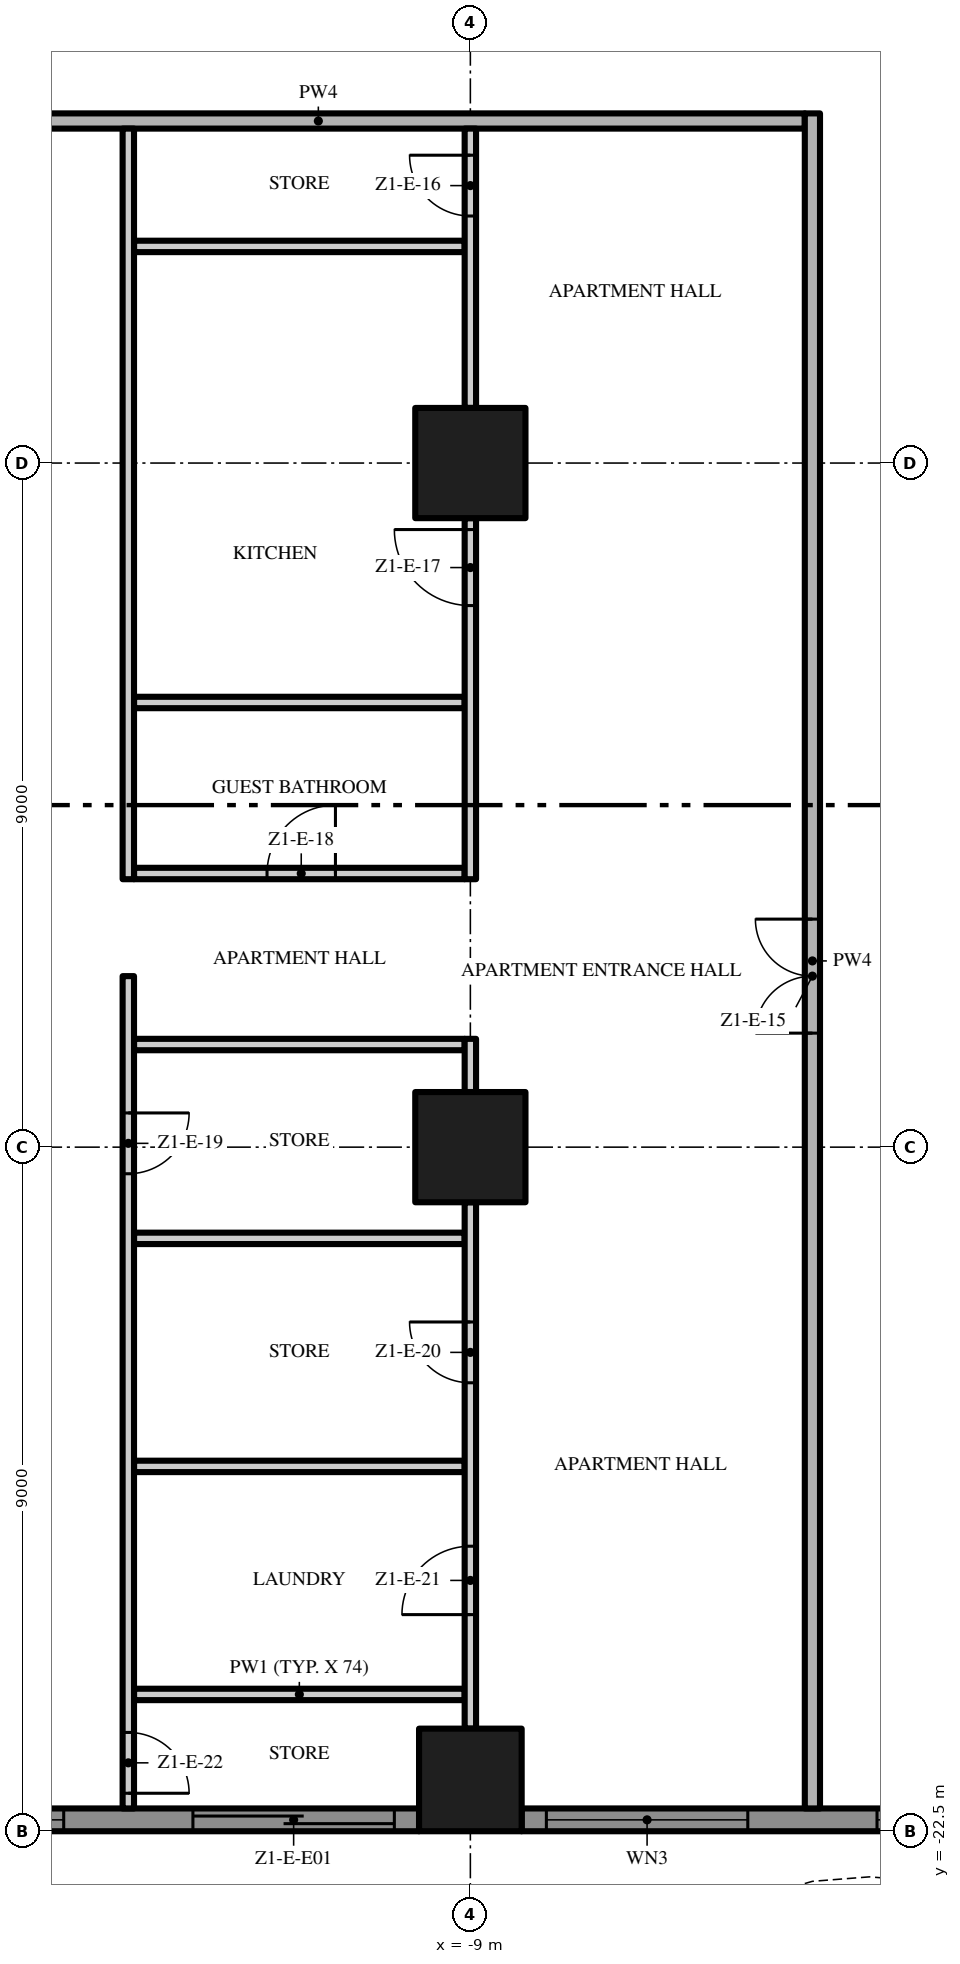
"""IFC4 building model, lengths in metres.
Left out: names, types, materials, properties, quantities, classifications, styles, units other than length and angle.
Written with IfcOpenShell. Run it as: python <this file> out.ifc"""

import sys

from ifc_helpers import new_model, si_unit, direction, frame, frame_2d, origin, origin_2d, place, context, subcontext, project, spatial, polyline, rectangle, outline, extrude, element, fill, save


model = new_model("IFC4")
c1 = context("Model", 3, precision=1e-05, world=origin(), true_north=direction((0.0, 1.0)))
c2 = subcontext(c1, "Body", "Model", "MODEL_VIEW")
j1 = project(units=[si_unit("LENGTHUNIT", "METRE"), si_unit("PLANEANGLEUNIT", "RADIAN")], contexts=[c1])
p1 = place(None, origin())
s1 = spatial("IfcSite", under=j1, at=p1, CompositionType="ELEMENT")
p2 = place(p1, origin())
s2 = spatial("IfcBuilding", under=s1, at=p2, CompositionType="ELEMENT")
p3 = place(p2, frame((0.0, 0.0, 60.6)))
s3 = spatial("IfcBuildingStorey", under=s2, at=p3, CompositionType="ELEMENT", Elevation=60.6)
p4 = place(p3, frame((-9.0, -13.5, 0.0), z_axis=(0.0, 0.0, 1.0), x_axis=(1.0, 0.0, 0.0)))
e1 = element("IfcColumn", 1, at=p4, inside=s3, PredefinedType="COLUMN", context=c2, shape_type="SweptSolid", body=[
    extrude(rectangle(XDim=1.45, YDim=1.45, at=origin_2d()), origin(), (0.0, 0.0, 1.0), 3.5),
])
p5 = place(p3, frame((-9.0, -21.825, 0.0), z_axis=(0.0, 0.0, 1.0), x_axis=(1.0, 0.0, 0.0)))
e2 = element("IfcColumn", 2, at=p5, inside=s3, PredefinedType="COLUMN", context=c2, shape_type="SweptSolid", body=[
    extrude(rectangle(XDim=1.35, YDim=1.35, at=origin_2d()), origin(), (0.0, 0.0, 1.0), 3.5),
])
p6 = place(p3, frame((-9.0, -4.5, 0.0), z_axis=(0.0, 0.0, 1.0), x_axis=(1.0, 0.0, 0.0)))
e3 = element("IfcColumn", 3, at=p6, inside=s3, PredefinedType="COLUMN", context=c2, shape_type="SweptSolid", body=[
    extrude(rectangle(XDim=1.45, YDim=1.45, at=origin_2d()), origin(), (0.0, 0.0, 1.0), 3.5),
])
p7 = place(p3, frame((-9.675, -22.35, 0.0), z_axis=(0.0, 0.0, 1.0), x_axis=(-1.0, 0.0, 0.0)))
e4 = element("IfcWall", 4, at=p7, inside=s3, PredefinedType="SOLIDWALL", context=c2, shape_type="SweptSolid", body=[
    extrude(rectangle(XDim=7.65, YDim=0.3, at=frame_2d((3.825, 0.0))), origin(), (0.0, 0.0, 1.0), 3.5),
])
p8 = place(p7, frame((4.675, 0.0, 0.45)))
e5 = element("IfcOpeningElement", 5, at=p8, cuts=e4, PredefinedType="OPENING", context=c2, shape_type="SweptSolid", body=[
    extrude(rectangle(XDim=2.65, YDim=2.65, at=frame_2d((1.325, 1.325))), frame((0.0, 0.16, 0.0), z_axis=(0.0, -1.0, 0.0), x_axis=(1.0, 0.0, 0.0)), (0.0, 0.0, 1.0), 0.32),
])
p9 = place(p7, frame((0.325, 0.0, 0.0)))
e6 = element("IfcOpeningElement", 6, at=p9, cuts=e4, PredefinedType="OPENING", context=c2, shape_type="SweptSolid", body=[
    extrude(rectangle(XDim=2.65, YDim=2.4, at=frame_2d((1.325, 1.2))), frame((0.0, 0.16, 0.0), z_axis=(0.0, -1.0, 0.0), x_axis=(1.0, 0.0, 0.0)), (0.0, 0.0, 1.0), 0.32),
])
p10 = place(p3, frame((-0.675, -22.35, 0.0), z_axis=(0.0, 0.0, 1.0), x_axis=(-1.0, 0.0, 0.0)))
e7 = element("IfcWall", 7, at=p10, inside=s3, PredefinedType="SOLIDWALL", context=c2, shape_type="SweptSolid", body=[
    extrude(rectangle(XDim=7.65, YDim=0.3, at=frame_2d((3.825, 0.0))), origin(), (0.0, 0.0, 1.0), 3.5),
])
p11 = place(p10, frame((4.675, 0.0, 0.45)))
e8 = element("IfcOpeningElement", 8, at=p11, cuts=e7, PredefinedType="OPENING", context=c2, shape_type="SweptSolid", body=[
    extrude(rectangle(XDim=2.65, YDim=2.65, at=frame_2d((1.325, 1.325))), frame((0.0, 0.16, 0.0), z_axis=(0.0, -1.0, 0.0), x_axis=(1.0, 0.0, 0.0)), (0.0, 0.0, 1.0), 0.32),
])
p12 = place(p10, frame((0.325, 0.0, 0.45)))
e9 = element("IfcOpeningElement", 9, at=p12, cuts=e7, PredefinedType="OPENING", context=c2, shape_type="SweptSolid", body=[
    extrude(rectangle(XDim=2.65, YDim=2.65, at=frame_2d((1.325, 1.325))), frame((0.0, 0.16, 0.0), z_axis=(0.0, -1.0, 0.0), x_axis=(1.0, 0.0, 0.0)), (0.0, 0.0, 1.0), 0.32),
])
p13 = place(p3, origin())
e10 = element("IfcWall", 10, at=p13, inside=s3, PredefinedType="USERDEFINED", context=c2, shape_type="SweptSolid", body=[
    extrude(outline(polyline([(-22.5, -24.3), (-21.0, -23.595), (-19.5, -23.159), (-18.75, -23.1), (-18.0, -23.159), (-16.5, -23.595), (-15.0, -24.3), (-13.5, -25.005), (-12.0, -25.441), (-11.25, -25.5), (-10.5, -25.441), (-9.0, -25.005), (-7.5, -24.3), (-6.0, -23.595), (-4.5, -23.159), (-3.75, -23.1), (-3.0, -23.159), (-1.5, -23.595), (0.0, -24.3), (1.5, -25.005), (3.0, -25.441), (3.75, -25.5), (4.5, -25.441), (6.0, -25.005), (7.5, -24.3), (9.0, -23.595), (10.5, -23.159), (11.25, -23.1), (12.0, -23.159), (13.5, -23.595), (15.0, -24.3), (16.5, -25.005), (18.0, -25.441), (18.75, -25.5), (19.5, -25.441), (21.0, -25.005), (22.5, -24.3), (22.394, -24.074), (20.911, -24.771), (19.455, -25.194), (18.75, -25.249), (18.045, -25.194), (16.589, -24.771), (15.106, -24.074), (13.589, -23.36), (12.045, -22.911), (11.25, -22.849), (10.455, -22.911), (8.911, -23.36), (7.394, -24.074), (5.911, -24.771), (4.455, -25.194), (3.75, -25.249), (3.045, -25.194), (1.589, -24.771), (0.106, -24.074), (-1.411, -23.36), (-2.955, -22.911), (-3.75, -22.849), (-4.545, -22.911), (-6.089, -23.36), (-7.606, -24.074), (-9.089, -24.771), (-10.545, -25.194), (-11.25, -25.249), (-11.955, -25.194), (-13.411, -24.771), (-14.894, -24.074), (-16.411, -23.36), (-17.955, -22.911), (-18.75, -22.849), (-19.545, -22.911), (-21.089, -23.36), (-22.606, -24.074), (-22.5, -24.3)])), origin(), (0.0, 0.0, 1.0), 0.9),
])
for number, where, z_axis, x_axis in (
    (11, (-13.425, -20.7, 0.0), (0.0, 0.0, 1.0), (1.0, 0.0, 0.0)),
    (12, (-13.425, -17.7, 0.0), (0.0, 0.0, 1.0), (1.0, 0.0, 0.0)),
    (13, (-13.425, -14.7, 0.0), (0.0, 0.0, 1.0), (1.0, 0.0, 0.0)),
    (14, (-13.425, -12.15, 0.0), (0.0, 0.0, 1.0), (1.0, 0.0, 0.0)),
):
    element("IfcWall", number, at=place(p3, frame(where, z_axis=z_axis, x_axis=x_axis)), inside=s3, PredefinedType="PARTITIONING", context=c2, shape_type="SweptSolid", body=[
        extrude(rectangle(XDim=4.35, YDim=0.15, at=frame_2d((2.175, 0.0))), origin(), (0.0, 0.0, 1.0), 3.5),
    ])
p14 = place(p3, frame((-13.425, -9.9, 0.0), z_axis=(0.0, 0.0, 1.0), x_axis=(1.0, 0.0, 0.0)))
e15 = element("IfcWall", 15, at=p14, inside=s3, PredefinedType="PARTITIONING", context=c2, shape_type="SweptSolid", body=[
    extrude(rectangle(XDim=4.35, YDim=0.15, at=frame_2d((2.175, 0.0))), origin(), (0.0, 0.0, 1.0), 3.5),
])
p15 = place(p14, frame((1.75, 0.0, 0.0)))
e16 = element("IfcOpeningElement", 16, at=p15, cuts=e15, PredefinedType="OPENING", context=c2, shape_type="SweptSolid", body=[
    extrude(rectangle(XDim=0.9, YDim=2.1, at=frame_2d((0.45, 1.05))), frame((0.0, 0.085, 0.0), z_axis=(0.0, -1.0, 0.0), x_axis=(1.0, 0.0, 0.0)), (0.0, 0.0, 1.0), 0.17),
])
for number, where, z_axis, x_axis in (
    (17, (-13.425, -7.65, 0.0), (0.0, 0.0, 1.0), (1.0, 0.0, 0.0)),
    (18, (-13.425, -1.65, 0.0), (0.0, 0.0, 1.0), (1.0, 0.0, 0.0)),
):
    element("IfcWall", number, at=place(p3, frame(where, z_axis=z_axis, x_axis=x_axis)), inside=s3, PredefinedType="PARTITIONING", context=c2, shape_type="SweptSolid", body=[
        extrude(rectangle(XDim=4.35, YDim=0.15, at=frame_2d((2.175, 0.0))), origin(), (0.0, 0.0, 1.0), 3.5),
    ])
p16 = place(p3, frame((-17.4, 0.0, 0.0), z_axis=(0.0, 0.0, 1.0), x_axis=(1.0, 0.0, 0.0)))
e19 = element("IfcWall", 19, at=p16, inside=s3, PredefinedType="PARTITIONING", context=c2, shape_type="SweptSolid", body=[
    extrude(rectangle(XDim=12.8, YDim=0.2, at=frame_2d((6.4, 0.0))), origin(), (0.0, 0.0, 1.0), 3.5),
])
p17 = place(p3, frame((-13.5, -11.25, 0.0), z_axis=(0.0, 0.0, 1.0), x_axis=(0.0, -1.0, 0.0)))
e20 = element("IfcWall", 20, at=p17, inside=s3, PredefinedType="PARTITIONING", context=c2, shape_type="SweptSolid", body=[
    extrude(rectangle(XDim=10.95, YDim=0.15, at=frame_2d((5.475, 0.0))), origin(), (0.0, 0.0, 1.0), 3.5),
])
p18 = place(p17, frame((1.8, 0.0, 0.0)))
e21 = element("IfcOpeningElement", 21, at=p18, cuts=e20, PredefinedType="OPENING", context=c2, shape_type="SweptSolid", body=[
    extrude(rectangle(XDim=0.8, YDim=2.0, at=frame_2d((0.4, 1.0))), frame((0.0, 0.085, 0.0), z_axis=(0.0, -1.0, 0.0), x_axis=(1.0, 0.0, 0.0)), (0.0, 0.0, 1.0), 0.17),
])
p19 = place(p17, frame((9.95, 0.0, 0.0)))
e22 = element("IfcOpeningElement", 22, at=p19, cuts=e20, PredefinedType="OPENING", context=c2, shape_type="SweptSolid", body=[
    extrude(rectangle(XDim=0.8, YDim=2.0, at=frame_2d((0.4, 1.0))), frame((0.0, 0.085, 0.0), z_axis=(0.0, -1.0, 0.0), x_axis=(1.0, 0.0, 0.0)), (0.0, 0.0, 1.0), 0.17),
])
p20 = place(p3, frame((-13.5, -9.975, 0.0), z_axis=(0.0, 0.0, 1.0), x_axis=(0.0, 1.0, 0.0)))
e23 = element("IfcWall", 23, at=p20, inside=s3, PredefinedType="PARTITIONING", context=c2, shape_type="SweptSolid", body=[
    extrude(rectangle(XDim=9.875, YDim=0.15, at=frame_2d((4.938, 0.0))), origin(), (0.0, 0.0, 1.0), 3.5),
])
p21 = place(p3, frame((-9.0, -21.15, 0.0), z_axis=(0.0, 0.0, 1.0), x_axis=(0.0, 1.0, 0.0)))
e24 = element("IfcWall", 24, at=p21, inside=s3, PredefinedType="PARTITIONING", context=c2, shape_type="SweptSolid", body=[
    extrude(rectangle(XDim=6.925, YDim=0.15, at=frame_2d((3.462, 0.0))), origin(), (0.0, 0.0, 1.0), 3.5),
])
p22 = place(p21, frame((4.55, 0.0, 0.0)))
e25 = element("IfcOpeningElement", 25, at=p22, cuts=e24, PredefinedType="OPENING", context=c2, shape_type="SweptSolid", body=[
    extrude(rectangle(XDim=0.8, YDim=2.0, at=frame_2d((0.4, 1.0))), frame((0.0, 0.085, 0.0), z_axis=(0.0, -1.0, 0.0), x_axis=(1.0, 0.0, 0.0)), (0.0, 0.0, 1.0), 0.17),
])
p23 = place(p21, frame((1.5, 0.0, 0.0)))
e26 = element("IfcOpeningElement", 26, at=p23, cuts=e24, PredefinedType="OPENING", context=c2, shape_type="SweptSolid", body=[
    extrude(rectangle(XDim=0.9, YDim=2.1, at=frame_2d((0.45, 1.05))), frame((0.0, 0.085, 0.0), z_axis=(0.0, -1.0, 0.0), x_axis=(1.0, 0.0, 0.0)), (0.0, 0.0, 1.0), 0.17),
])
p24 = place(p3, frame((-9.0, -12.775, 0.0), z_axis=(0.0, 0.0, 1.0), x_axis=(0.0, 1.0, 0.0)))
e27 = element("IfcWall", 27, at=p24, inside=s3, PredefinedType="PARTITIONING", context=c2, shape_type="SweptSolid", body=[
    extrude(rectangle(XDim=0.7, YDim=0.15, at=frame_2d((0.35, 0.0))), origin(), (0.0, 0.0, 1.0), 3.5),
])
p25 = place(p3, frame((-9.0, -9.975, 0.0), z_axis=(0.0, 0.0, 1.0), x_axis=(0.0, 1.0, 0.0)))
e28 = element("IfcWall", 28, at=p25, inside=s3, PredefinedType="PARTITIONING", context=c2, shape_type="SweptSolid", body=[
    extrude(rectangle(XDim=4.75, YDim=0.15, at=frame_2d((2.375, 0.0))), origin(), (0.0, 0.0, 1.0), 3.5),
])
p26 = place(p25, frame((3.6, 0.0, 0.0)))
e29 = element("IfcOpeningElement", 29, at=p26, cuts=e28, PredefinedType="OPENING", context=c2, shape_type="SweptSolid", body=[
    extrude(rectangle(XDim=1.0, YDim=2.4, at=frame_2d((0.5, 1.2))), frame((0.0, 0.085, 0.0), z_axis=(0.0, -1.0, 0.0), x_axis=(1.0, 0.0, 0.0)), (0.0, 0.0, 1.0), 0.17),
])
p27 = place(p3, frame((-9.0, -3.775, 0.0), z_axis=(0.0, 0.0, 1.0), x_axis=(0.0, 1.0, 0.0)))
e30 = element("IfcWall", 30, at=p27, inside=s3, PredefinedType="PARTITIONING", context=c2, shape_type="SweptSolid", body=[
    extrude(rectangle(XDim=3.675, YDim=0.15, at=frame_2d((1.837, 0.0))), origin(), (0.0, 0.0, 1.0), 3.5),
])
p28 = place(p27, frame((2.525, 0.0, 0.0)))
e31 = element("IfcOpeningElement", 31, at=p28, cuts=e30, PredefinedType="OPENING", context=c2, shape_type="SweptSolid", body=[
    extrude(rectangle(XDim=0.8, YDim=2.0, at=frame_2d((0.4, 1.0))), frame((0.0, 0.085, 0.0), z_axis=(0.0, -1.0, 0.0), x_axis=(1.0, 0.0, 0.0)), (0.0, 0.0, 1.0), 0.17),
])
p29 = place(p3, frame((-4.5, -22.2, 0.0), z_axis=(0.0, 0.0, 1.0), x_axis=(0.0, 1.0, 0.0)))
e32 = element("IfcWall", 32, at=p29, inside=s3, PredefinedType="PARTITIONING", context=c2, shape_type="SweptSolid", body=[
    extrude(rectangle(XDim=22.3, YDim=0.2, at=frame_2d((11.15, 0.0))), origin(), (0.0, 0.0, 1.0), 3.5),
])
p30 = place(p29, frame((10.2, 0.0, 0.0)))
e33 = element("IfcOpeningElement", 33, at=p30, cuts=e32, PredefinedType="OPENING", context=c2, shape_type="SweptSolid", body=[
    extrude(rectangle(XDim=1.5, YDim=2.4, at=frame_2d((0.75, 1.2))), frame((0.0, 0.11, 0.0), z_axis=(0.0, -1.0, 0.0), x_axis=(1.0, 0.0, 0.0)), (0.0, 0.0, 1.0), 0.22),
])
p31 = place(p8, origin())
e34 = element("IfcWindow", 34, at=p31, inside=s3, PartitioningType="SINGLE_PANEL", PredefinedType="WINDOW", context=c2, shape_type="SweptSolid", body=[
    extrude(rectangle(XDim=2.65, YDim=2.65, at=frame_2d((1.325, 1.325))), frame((0.0, 0.03, 0.0), z_axis=(0.0, -1.0, 0.0), x_axis=(1.0, 0.0, 0.0)), (0.0, 0.0, 1.0), 0.06),
])
fill(e5, e34)
p32 = place(p9, origin())
e35 = element("IfcDoor", 35, at=p32, inside=s3, OperationType="SINGLE_SWING_LEFT", PredefinedType="DOOR", context=c2, shape_type="SweptSolid", body=[
    extrude(rectangle(XDim=2.65, YDim=2.4, at=frame_2d((1.325, 1.2))), frame((0.0, 0.025, 0.0), z_axis=(0.0, -1.0, 0.0), x_axis=(1.0, 0.0, 0.0)), (0.0, 0.0, 1.0), 0.05),
])
fill(e6, e35)
p33 = place(p11, origin())
e36 = element("IfcWindow", 36, at=p33, inside=s3, PartitioningType="SINGLE_PANEL", PredefinedType="WINDOW", context=c2, shape_type="SweptSolid", body=[
    extrude(rectangle(XDim=2.65, YDim=2.65, at=frame_2d((1.325, 1.325))), frame((0.0, 0.03, 0.0), z_axis=(0.0, -1.0, 0.0), x_axis=(1.0, 0.0, 0.0)), (0.0, 0.0, 1.0), 0.06),
])
fill(e8, e36)
p34 = place(p12, origin())
e37 = element("IfcWindow", 37, at=p34, inside=s3, PartitioningType="SINGLE_PANEL", PredefinedType="WINDOW", context=c2, shape_type="SweptSolid", body=[
    extrude(rectangle(XDim=2.65, YDim=2.65, at=frame_2d((1.325, 1.325))), frame((0.0, 0.03, 0.0), z_axis=(0.0, -1.0, 0.0), x_axis=(1.0, 0.0, 0.0)), (0.0, 0.0, 1.0), 0.06),
])
fill(e9, e37)
p35 = place(p30, origin())
e38 = element("IfcDoor", 38, at=p35, inside=s3, OperationType="DOUBLE_DOOR_SINGLE_SWING", PredefinedType="DOOR", context=c2, shape_type="SweptSolid", body=[
    extrude(rectangle(XDim=1.5, YDim=2.4, at=frame_2d((0.75, 1.2))), frame((0.0, 0.025, 0.0), z_axis=(0.0, -1.0, 0.0), x_axis=(1.0, 0.0, 0.0)), (0.0, 0.0, 1.0), 0.05),
])
fill(e33, e38)
p36 = place(p28, origin())
e39 = element("IfcDoor", 39, at=p36, inside=s3, OperationType="SINGLE_SWING_RIGHT", PredefinedType="DOOR", context=c2, shape_type="SweptSolid", body=[
    extrude(rectangle(XDim=0.8, YDim=2.0, at=frame_2d((0.4, 1.0))), frame((0.0, 0.025, 0.0), z_axis=(0.0, -1.0, 0.0), x_axis=(1.0, 0.0, 0.0)), (0.0, 0.0, 1.0), 0.05),
])
fill(e31, e39)
p37 = place(p26, origin())
e40 = element("IfcDoor", 40, at=p37, inside=s3, OperationType="SINGLE_SWING_RIGHT", PredefinedType="DOOR", context=c2, shape_type="SweptSolid", body=[
    extrude(rectangle(XDim=1.0, YDim=2.4, at=frame_2d((0.5, 1.2))), frame((0.0, 0.025, 0.0), z_axis=(0.0, -1.0, 0.0), x_axis=(1.0, 0.0, 0.0)), (0.0, 0.0, 1.0), 0.05),
])
fill(e29, e40)
p38 = place(p15, origin())
e41 = element("IfcDoor", 41, at=p38, inside=s3, OperationType="SINGLE_SWING_RIGHT", PredefinedType="DOOR", context=c2, shape_type="SweptSolid", body=[
    extrude(rectangle(XDim=0.9, YDim=2.1, at=frame_2d((0.45, 1.05))), frame((0.0, 0.025, 0.0), z_axis=(0.0, -1.0, 0.0), x_axis=(1.0, 0.0, 0.0)), (0.0, 0.0, 1.0), 0.05),
])
fill(e16, e41)
p39 = place(p18, origin())
e42 = element("IfcDoor", 42, at=p39, inside=s3, OperationType="SINGLE_SWING_LEFT", PredefinedType="DOOR", context=c2, shape_type="SweptSolid", body=[
    extrude(rectangle(XDim=0.8, YDim=2.0, at=frame_2d((0.4, 1.0))), frame((0.0, 0.025, 0.0), z_axis=(0.0, -1.0, 0.0), x_axis=(1.0, 0.0, 0.0)), (0.0, 0.0, 1.0), 0.05),
])
fill(e21, e42)
p40 = place(p22, origin())
e43 = element("IfcDoor", 43, at=p40, inside=s3, OperationType="SINGLE_SWING_RIGHT", PredefinedType="DOOR", context=c2, shape_type="SweptSolid", body=[
    extrude(rectangle(XDim=0.8, YDim=2.0, at=frame_2d((0.4, 1.0))), frame((0.0, 0.025, 0.0), z_axis=(0.0, -1.0, 0.0), x_axis=(1.0, 0.0, 0.0)), (0.0, 0.0, 1.0), 0.05),
])
fill(e25, e43)
p41 = place(p23, origin())
e44 = element("IfcDoor", 44, at=p41, inside=s3, OperationType="SINGLE_SWING_LEFT", PredefinedType="DOOR", context=c2, shape_type="SweptSolid", body=[
    extrude(rectangle(XDim=0.9, YDim=2.1, at=frame_2d((0.45, 1.05))), frame((0.0, 0.025, 0.0), z_axis=(0.0, -1.0, 0.0), x_axis=(1.0, 0.0, 0.0)), (0.0, 0.0, 1.0), 0.05),
])
fill(e26, e44)
p42 = place(p19, origin())
e45 = element("IfcDoor", 45, at=p42, inside=s3, OperationType="SINGLE_SWING_RIGHT", PredefinedType="DOOR", context=c2, shape_type="SweptSolid", body=[
    extrude(rectangle(XDim=0.8, YDim=2.0, at=frame_2d((0.4, 1.0))), frame((0.0, 0.025, 0.0), z_axis=(0.0, -1.0, 0.0), x_axis=(1.0, 0.0, 0.0)), (0.0, 0.0, 1.0), 0.05),
])
fill(e22, e45)
save(model, sys.argv[1])
